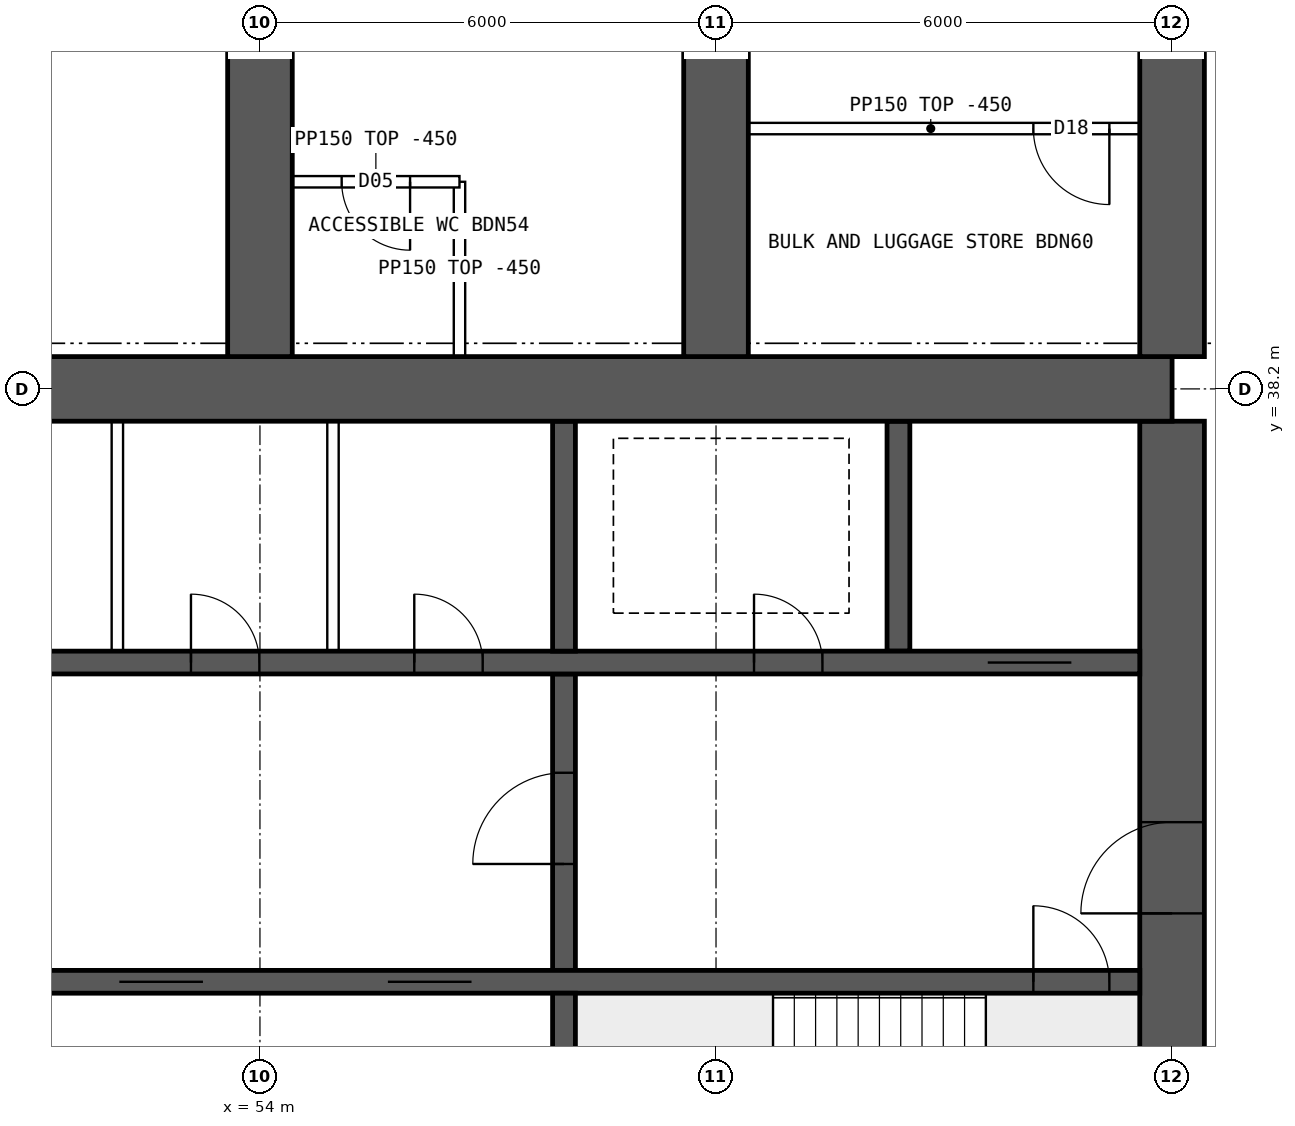
"""IFC4 building model, lengths in metres.
Left out: names, types, materials, properties, quantities, classifications, styles, units other than length and angle.
Written with IfcOpenShell. Run it as: python <this file> out.ifc"""

import sys

from ifc_helpers import new_model, si_unit, direction, frame, frame_2d, origin, place, context, subcontext, project, spatial, rectangle, extrude, element, fill, save


model = new_model("IFC4")
c1 = context("Model", 3, precision=1e-05, world=origin(), true_north=direction((0.0, 1.0)))
c2 = subcontext(c1, "Body", "Model", "MODEL_VIEW")
j1 = project(units=[si_unit("LENGTHUNIT", "METRE"), si_unit("PLANEANGLEUNIT", "RADIAN")], contexts=[c1])
p1 = place(None, origin())
s1 = spatial("IfcSite", under=j1, at=p1, CompositionType="ELEMENT")
p2 = place(p1, origin())
s2 = spatial("IfcBuilding", under=s1, at=p2, CompositionType="ELEMENT")
p3 = place(p2, frame((0.0, 0.0, 189.85)))
s3 = spatial("IfcBuildingStorey", under=s2, at=p3, CompositionType="ELEMENT", Elevation=189.85)
p4 = place(p3, frame((18.0, 38.2, 0.0), z_axis=(0.0, 0.0, 1.0), x_axis=(1.0, 0.0, 0.0)))
e1 = element("IfcWall", 1, at=p4, inside=s3, PredefinedType="SHEAR", context=c2, shape_type="SweptSolid", body=[
    extrude(rectangle(XDim=48.0, YDim=0.85, at=frame_2d((24.0, 0.0))), origin(), (0.0, 0.0, 1.0), 3.75),
])
p5 = place(p3, frame((66.0, 26.225, 0.0), z_axis=(0.0, 0.0, 1.0), x_axis=(0.0, 1.0, 0.0)))
e2 = element("IfcWall", 2, at=p5, inside=s3, PredefinedType="SHEAR", context=c2, shape_type="SweptSolid", body=[
    extrude(rectangle(XDim=11.55, YDim=0.85, at=frame_2d((5.775, 0.0))), origin(), (0.0, 0.0, 1.0), 3.75),
])
p6 = place(p5, frame((5.075, 0.0, 0.0)))
e3 = element("IfcOpeningElement", 3, at=p6, cuts=e2, PredefinedType="OPENING", context=c2, shape_type="SweptSolid", body=[
    extrude(rectangle(XDim=1.2, YDim=2.1, at=frame_2d((0.6, 1.05))), frame((0.0, 0.435, 0.0), z_axis=(0.0, -1.0, 0.0), x_axis=(1.0, 0.0, 0.0)), (0.0, 0.0, 1.0), 0.87),
])
p7 = place(p3, frame((18.425, 30.4, 0.0), z_axis=(0.0, 0.0, 1.0), x_axis=(1.0, 0.0, 0.0)))
e4 = element("IfcWall", 4, at=p7, inside=s3, PredefinedType="SHEAR", context=c2, shape_type="SweptSolid", body=[
    extrude(rectangle(XDim=47.15, YDim=0.3, at=frame_2d((23.575, 0.0))), origin(), (0.0, 0.0, 1.0), 3.75),
])
p8 = place(p7, frame((0.4, 0.0, 0.0)))
e5 = element("IfcOpeningElement", 5, at=p8, cuts=e4, PredefinedType="OPENING", context=c2, shape_type="SweptSolid", body=[
    extrude(rectangle(XDim=1.0, YDim=2.1, at=frame_2d((0.5, 1.05))), frame((0.0, 0.16, 0.0), z_axis=(0.0, -1.0, 0.0), x_axis=(1.0, 0.0, 0.0)), (0.0, 0.0, 1.0), 0.32),
])
p9 = place(p7, frame((45.75, 0.0, 0.0)))
e6 = element("IfcOpeningElement", 6, at=p9, cuts=e4, PredefinedType="OPENING", context=c2, shape_type="SweptSolid", body=[
    extrude(rectangle(XDim=1.0, YDim=2.1, at=frame_2d((0.5, 1.05))), frame((0.0, 0.16, 0.0), z_axis=(0.0, -1.0, 0.0), x_axis=(1.0, 0.0, 0.0)), (0.0, 0.0, 1.0), 0.32),
])
p10 = place(p7, frame((8.325, 0.0, 0.0)))
e7 = element("IfcOpeningElement", 7, at=p10, cuts=e4, PredefinedType="OPENING", context=c2, shape_type="SweptSolid", body=[
    extrude(rectangle(XDim=1.1, YDim=2.1, at=frame_2d((0.55, 1.05))), frame((0.0, 0.16, 0.0), z_axis=(0.0, -1.0, 0.0), x_axis=(1.0, 0.0, 0.0)), (0.0, 0.0, 1.0), 0.32),
])
p11 = place(p7, frame((10.925, 0.0, 0.0)))
e8 = element("IfcOpeningElement", 8, at=p11, cuts=e4, PredefinedType="OPENING", context=c2, shape_type="SweptSolid", body=[
    extrude(rectangle(XDim=1.1, YDim=2.1, at=frame_2d((0.55, 1.05))), frame((0.0, 0.16, 0.0), z_axis=(0.0, -1.0, 0.0), x_axis=(1.0, 0.0, 0.0)), (0.0, 0.0, 1.0), 0.32),
])
p12 = place(p7, frame((13.525, 0.0, 0.0)))
e9 = element("IfcOpeningElement", 9, at=p12, cuts=e4, PredefinedType="OPENING", context=c2, shape_type="SweptSolid", body=[
    extrude(rectangle(XDim=1.1, YDim=2.1, at=frame_2d((0.55, 1.05))), frame((0.0, 0.16, 0.0), z_axis=(0.0, -1.0, 0.0), x_axis=(1.0, 0.0, 0.0)), (0.0, 0.0, 1.0), 0.32),
])
p13 = place(p7, frame((16.125, 0.0, 0.0)))
e10 = element("IfcOpeningElement", 10, at=p13, cuts=e4, PredefinedType="OPENING", context=c2, shape_type="SweptSolid", body=[
    extrude(rectangle(XDim=1.1, YDim=2.1, at=frame_2d((0.55, 1.05))), frame((0.0, 0.16, 0.0), z_axis=(0.0, -1.0, 0.0), x_axis=(1.0, 0.0, 0.0)), (0.0, 0.0, 1.0), 0.32),
])
p14 = place(p7, frame((18.9, 0.0, 0.0)))
e11 = element("IfcOpeningElement", 11, at=p14, cuts=e4, PredefinedType="OPENING", context=c2, shape_type="SweptSolid", body=[
    extrude(rectangle(XDim=0.9, YDim=2.1, at=frame_2d((0.45, 1.05))), frame((0.0, 0.16, 0.0), z_axis=(0.0, -1.0, 0.0), x_axis=(1.0, 0.0, 0.0)), (0.0, 0.0, 1.0), 0.32),
])
p15 = place(p7, frame((30.192, 0.0, 0.0)))
e12 = element("IfcOpeningElement", 12, at=p15, cuts=e4, PredefinedType="OPENING", context=c2, shape_type="SweptSolid", body=[
    extrude(rectangle(XDim=1.1, YDim=2.1, at=frame_2d((0.55, 1.05))), frame((0.0, 0.16, 0.0), z_axis=(0.0, -1.0, 0.0), x_axis=(1.0, 0.0, 0.0)), (0.0, 0.0, 1.0), 0.32),
])
p16 = place(p7, frame((33.725, 0.0, 0.0)))
e13 = element("IfcOpeningElement", 13, at=p16, cuts=e4, PredefinedType="OPENING", context=c2, shape_type="SweptSolid", body=[
    extrude(rectangle(XDim=1.1, YDim=2.1, at=frame_2d((0.55, 1.05))), frame((0.0, 0.16, 0.0), z_axis=(0.0, -1.0, 0.0), x_axis=(1.0, 0.0, 0.0)), (0.0, 0.0, 1.0), 0.32),
])
p17 = place(p7, frame((37.258, 0.0, 0.0)))
e14 = element("IfcOpeningElement", 14, at=p17, cuts=e4, PredefinedType="OPENING", context=c2, shape_type="SweptSolid", body=[
    extrude(rectangle(XDim=1.1, YDim=2.1, at=frame_2d((0.55, 1.05))), frame((0.0, 0.16, 0.0), z_axis=(0.0, -1.0, 0.0), x_axis=(1.0, 0.0, 0.0)), (0.0, 0.0, 1.0), 0.32),
])
p18 = place(p3, frame((18.425, 34.6, 0.0), z_axis=(0.0, 0.0, 1.0), x_axis=(1.0, 0.0, 0.0)))
e15 = element("IfcWall", 15, at=p18, inside=s3, PredefinedType="SHEAR", context=c2, shape_type="SweptSolid", body=[
    extrude(rectangle(XDim=47.15, YDim=0.3, at=frame_2d((23.575, 0.0))), origin(), (0.0, 0.0, 1.0), 3.75),
])
p19 = place(p18, frame((0.9, 0.0, 0.0)))
e16 = element("IfcOpeningElement", 16, at=p19, cuts=e15, PredefinedType="OPENING", context=c2, shape_type="SweptSolid", body=[
    extrude(rectangle(XDim=1.1, YDim=2.1, at=frame_2d((0.55, 1.05))), frame((0.0, 0.16, 0.0), z_axis=(0.0, -1.0, 0.0), x_axis=(1.0, 0.0, 0.0)), (0.0, 0.0, 1.0), 0.32),
])
p20 = place(p18, frame((45.15, 0.0, 0.0)))
e17 = element("IfcOpeningElement", 17, at=p20, cuts=e15, PredefinedType="OPENING", context=c2, shape_type="SweptSolid", body=[
    extrude(rectangle(XDim=1.1, YDim=2.1, at=frame_2d((0.55, 1.05))), frame((0.0, 0.16, 0.0), z_axis=(0.0, -1.0, 0.0), x_axis=(1.0, 0.0, 0.0)), (0.0, 0.0, 1.0), 0.32),
])
p21 = place(p18, frame((4.175, 0.0, 0.0)))
e18 = element("IfcOpeningElement", 18, at=p21, cuts=e15, PredefinedType="OPENING", context=c2, shape_type="SweptSolid", body=[
    extrude(rectangle(XDim=0.9, YDim=2.1, at=frame_2d((0.45, 1.05))), frame((0.0, 0.16, 0.0), z_axis=(0.0, -1.0, 0.0), x_axis=(1.0, 0.0, 0.0)), (0.0, 0.0, 1.0), 0.32),
])
p22 = place(p18, frame((42.075, 0.0, 0.0)))
e19 = element("IfcOpeningElement", 19, at=p22, cuts=e15, PredefinedType="OPENING", context=c2, shape_type="SweptSolid", body=[
    extrude(rectangle(XDim=0.9, YDim=2.1, at=frame_2d((0.45, 1.05))), frame((0.0, 0.16, 0.0), z_axis=(0.0, -1.0, 0.0), x_axis=(1.0, 0.0, 0.0)), (0.0, 0.0, 1.0), 0.32),
])
p23 = place(p18, frame((8.95, 0.0, 0.0)))
e20 = element("IfcOpeningElement", 20, at=p23, cuts=e15, PredefinedType="OPENING", context=c2, shape_type="SweptSolid", body=[
    extrude(rectangle(XDim=0.9, YDim=2.1, at=frame_2d((0.45, 1.05))), frame((0.0, 0.16, 0.0), z_axis=(0.0, -1.0, 0.0), x_axis=(1.0, 0.0, 0.0)), (0.0, 0.0, 1.0), 0.32),
])
p24 = place(p18, frame((12.924, 0.0, 0.0)))
e21 = element("IfcOpeningElement", 21, at=p24, cuts=e15, PredefinedType="OPENING", context=c2, shape_type="SweptSolid", body=[
    extrude(rectangle(XDim=0.9, YDim=2.1, at=frame_2d((0.45, 1.05))), frame((0.0, 0.16, 0.0), z_axis=(0.0, -1.0, 0.0), x_axis=(1.0, 0.0, 0.0)), (0.0, 0.0, 1.0), 0.32),
])
p25 = place(p18, frame((16.571, 0.0, 0.0)))
e22 = element("IfcOpeningElement", 22, at=p25, cuts=e15, PredefinedType="OPENING", context=c2, shape_type="SweptSolid", body=[
    extrude(rectangle(XDim=0.9, YDim=2.1, at=frame_2d((0.45, 1.05))), frame((0.0, 0.16, 0.0), z_axis=(0.0, -1.0, 0.0), x_axis=(1.0, 0.0, 0.0)), (0.0, 0.0, 1.0), 0.32),
])
p26 = place(p18, frame((20.33, 0.0, 0.0)))
e23 = element("IfcOpeningElement", 23, at=p26, cuts=e15, PredefinedType="OPENING", context=c2, shape_type="SweptSolid", body=[
    extrude(rectangle(XDim=0.9, YDim=2.1, at=frame_2d((0.45, 1.05))), frame((0.0, 0.16, 0.0), z_axis=(0.0, -1.0, 0.0), x_axis=(1.0, 0.0, 0.0)), (0.0, 0.0, 1.0), 0.32),
])
p27 = place(p18, frame((24.736, 0.0, 0.0)))
e24 = element("IfcOpeningElement", 24, at=p27, cuts=e15, PredefinedType="OPENING", context=c2, shape_type="SweptSolid", body=[
    extrude(rectangle(XDim=0.9, YDim=2.1, at=frame_2d((0.45, 1.05))), frame((0.0, 0.16, 0.0), z_axis=(0.0, -1.0, 0.0), x_axis=(1.0, 0.0, 0.0)), (0.0, 0.0, 1.0), 0.32),
])
p28 = place(p18, frame((27.533, 0.0, 0.0)))
e25 = element("IfcOpeningElement", 25, at=p28, cuts=e15, PredefinedType="OPENING", context=c2, shape_type="SweptSolid", body=[
    extrude(rectangle(XDim=0.9, YDim=2.1, at=frame_2d((0.45, 1.05))), frame((0.0, 0.16, 0.0), z_axis=(0.0, -1.0, 0.0), x_axis=(1.0, 0.0, 0.0)), (0.0, 0.0, 1.0), 0.32),
])
p29 = place(p18, frame((30.716, 0.0, 0.0)))
e26 = element("IfcOpeningElement", 26, at=p29, cuts=e15, PredefinedType="OPENING", context=c2, shape_type="SweptSolid", body=[
    extrude(rectangle(XDim=0.9, YDim=2.1, at=frame_2d((0.45, 1.05))), frame((0.0, 0.16, 0.0), z_axis=(0.0, -1.0, 0.0), x_axis=(1.0, 0.0, 0.0)), (0.0, 0.0, 1.0), 0.32),
])
p30 = place(p18, frame((34.667, 0.0, 0.0)))
e27 = element("IfcOpeningElement", 27, at=p30, cuts=e15, PredefinedType="OPENING", context=c2, shape_type="SweptSolid", body=[
    extrude(rectangle(XDim=0.9, YDim=2.1, at=frame_2d((0.45, 1.05))), frame((0.0, 0.16, 0.0), z_axis=(0.0, -1.0, 0.0), x_axis=(1.0, 0.0, 0.0)), (0.0, 0.0, 1.0), 0.32),
])
p31 = place(p18, frame((37.605, 0.0, 0.0)))
e28 = element("IfcOpeningElement", 28, at=p31, cuts=e15, PredefinedType="OPENING", context=c2, shape_type="SweptSolid", body=[
    extrude(rectangle(XDim=0.9, YDim=2.1, at=frame_2d((0.45, 1.05))), frame((0.0, 0.16, 0.0), z_axis=(0.0, -1.0, 0.0), x_axis=(1.0, 0.0, 0.0)), (0.0, 0.0, 1.0), 0.32),
])
p32 = place(p3, frame((58.0, 26.225, 0.0), z_axis=(0.0, 0.0, 1.0), x_axis=(0.0, 1.0, 0.0)))
e29 = element("IfcWall", 29, at=p32, inside=s3, PredefinedType="SHEAR", context=c2, shape_type="SweptSolid", body=[
    extrude(rectangle(XDim=4.025, YDim=0.3, at=frame_2d((2.012, 0.0))), origin(), (0.0, 0.0, 1.0), 3.75),
])
p33 = place(p3, frame((58.0, 30.55, 0.0), z_axis=(0.0, 0.0, 1.0), x_axis=(0.0, 1.0, 0.0)))
e30 = element("IfcWall", 30, at=p33, inside=s3, PredefinedType="SHEAR", context=c2, shape_type="SweptSolid", body=[
    extrude(rectangle(XDim=3.9, YDim=0.3, at=frame_2d((1.95, 0.0))), origin(), (0.0, 0.0, 1.0), 3.75),
])
p34 = place(p33, frame((1.4, 0.0, 0.0)))
e31 = element("IfcOpeningElement", 31, at=p34, cuts=e30, PredefinedType="OPENING", context=c2, shape_type="SweptSolid", body=[
    extrude(rectangle(XDim=1.2, YDim=2.1, at=frame_2d((0.6, 1.05))), frame((0.0, 0.16, 0.0), z_axis=(0.0, -1.0, 0.0), x_axis=(1.0, 0.0, 0.0)), (0.0, 0.0, 1.0), 0.32),
])
for number, where, z_axis, x_axis in (
    (32, (62.4, 34.75, 0.0), (0.0, 0.0, 1.0), (0.0, 1.0, 0.0)),
    (33, (58.0, 34.75, 0.0), (0.0, 0.0, 1.0), (0.0, 1.0, 0.0)),
):
    element("IfcWall", number, at=place(p3, frame(where, z_axis=z_axis, x_axis=x_axis)), inside=s3, PredefinedType="SHEAR", context=c2, shape_type="SweptSolid", body=[
        extrude(rectangle(XDim=3.025, YDim=0.3, at=frame_2d((1.512, 0.0))), origin(), (0.0, 0.0, 1.0), 3.75),
    ])
for number, where, z_axis, x_axis in (
    (34, (54.0, 38.625, 0.0), (0.0, 0.0, 1.0), (0.0, 1.0, 0.0)),
    (35, (60.0, 38.625, 0.0), (0.0, 0.0, 1.0), (0.0, 1.0, 0.0)),
    (36, (66.0, 38.625, 0.0), (0.0, 0.0, 1.0), (0.0, 1.0, 0.0)),
):
    element("IfcWall", number, at=place(p3, frame(where, z_axis=z_axis, x_axis=x_axis)), inside=s3, PredefinedType="SHEAR", context=c2, shape_type="SweptSolid", body=[
        extrude(rectangle(XDim=8.175, YDim=0.85, at=frame_2d((4.087, 0.0))), origin(), (0.0, 0.0, 1.0), 3.75),
    ])
for number, where, z_axis, x_axis in (
    (37, (52.124, 34.75, 0.0), (0.0, 0.0, 1.0), (0.0, 1.0, 0.0)),
    (38, (54.961, 34.75, 0.0), (0.0, 0.0, 1.0), (0.0, 1.0, 0.0)),
):
    element("IfcWall", number, at=place(p3, frame(where, z_axis=z_axis, x_axis=x_axis)), inside=s3, PredefinedType="SOLIDWALL", context=c2, shape_type="SweptSolid", body=[
        extrude(rectangle(XDim=3.025, YDim=0.15, at=frame_2d((1.512, 0.0))), origin(), (0.0, 0.0, 1.0), 3.3),
    ])
p35 = place(p3, frame((56.625, 40.925, 0.0), z_axis=(0.0, 0.0, 1.0), x_axis=(0.0, -1.0, 0.0)))
e39 = element("IfcWall", 39, at=p35, inside=s3, PredefinedType="PARTITIONING", context=c2, shape_type="SweptSolid", body=[
    extrude(rectangle(XDim=2.3, YDim=0.15, at=frame_2d((1.15, 0.0))), origin(), (0.0, 0.0, 1.0), 3.3),
])
p36 = place(p3, frame((56.625, 40.925, 0.0), z_axis=(0.0, 0.0, 1.0), x_axis=(-1.0, 0.0, 0.0)))
e40 = element("IfcWall", 40, at=p36, inside=s3, PredefinedType="PARTITIONING", context=c2, shape_type="SweptSolid", body=[
    extrude(rectangle(XDim=2.2, YDim=0.15, at=frame_2d((1.1, 0.0))), origin(), (0.0, 0.0, 1.0), 3.3),
])
p37 = place(p36, frame((0.65, 0.0, 0.0)))
e41 = element("IfcOpeningElement", 41, at=p37, cuts=e40, PredefinedType="OPENING", context=c2, shape_type="SweptSolid", body=[
    extrude(rectangle(XDim=0.9, YDim=2.1, at=frame_2d((0.45, 1.05))), frame((0.0, 0.085, 0.0), z_axis=(0.0, -1.0, 0.0), x_axis=(1.0, 0.0, 0.0)), (0.0, 0.0, 1.0), 0.17),
])
p38 = place(p3, frame((65.575, 41.625, 0.0), z_axis=(0.0, 0.0, 1.0), x_axis=(-1.0, 0.0, 0.0)))
e42 = element("IfcWall", 42, at=p38, inside=s3, PredefinedType="PARTITIONING", context=c2, shape_type="SweptSolid", body=[
    extrude(rectangle(XDim=5.5, YDim=0.15, at=frame_2d((2.75, 0.0))), origin(), (0.0, 0.0, 1.0), 3.3),
])
p39 = place(p38, frame((0.4, 0.0, 0.0)))
e43 = element("IfcOpeningElement", 43, at=p39, cuts=e42, PredefinedType="OPENING", context=c2, shape_type="SweptSolid", body=[
    extrude(rectangle(XDim=1.0, YDim=2.1, at=frame_2d((0.5, 1.05))), frame((0.0, 0.085, 0.0), z_axis=(0.0, -1.0, 0.0), x_axis=(1.0, 0.0, 0.0)), (0.0, 0.0, 1.0), 0.17),
])
p40 = place(p6, origin())
e44 = element("IfcDoor", 44, at=p40, inside=s3, OperationType="SINGLE_SWING_LEFT", PredefinedType="DOOR", context=c2, shape_type="SweptSolid", body=[
    extrude(rectangle(XDim=1.2, YDim=2.1, at=frame_2d((0.6, 1.05))), frame((0.0, 0.025, 0.0), z_axis=(0.0, -1.0, 0.0), x_axis=(1.0, 0.0, 0.0)), (0.0, 0.0, 1.0), 0.05),
])
fill(e3, e44)
p41 = place(p9, origin())
e45 = element("IfcDoor", 45, at=p41, inside=s3, OperationType="SINGLE_SWING_LEFT", PredefinedType="DOOR", context=c2, shape_type="SweptSolid", body=[
    extrude(rectangle(XDim=1.0, YDim=2.1, at=frame_2d((0.5, 1.05))), frame((0.0, 0.025, 0.0), z_axis=(0.0, -1.0, 0.0), x_axis=(1.0, 0.0, 0.0)), (0.0, 0.0, 1.0), 0.05),
])
fill(e6, e45)
p42 = place(p20, origin())
e46 = element("IfcDoor", 46, at=p42, inside=s3, OperationType="DOUBLE_DOOR_SLIDING", PredefinedType="DOOR", context=c2, shape_type="SweptSolid", body=[
    extrude(rectangle(XDim=1.1, YDim=2.1, at=frame_2d((0.55, 1.05))), frame((0.0, 0.025, 0.0), z_axis=(0.0, -1.0, 0.0), x_axis=(1.0, 0.0, 0.0)), (0.0, 0.0, 1.0), 0.05),
])
fill(e17, e46)
p43 = place(p22, origin())
e47 = element("IfcDoor", 47, at=p43, inside=s3, OperationType="SINGLE_SWING_LEFT", PredefinedType="DOOR", context=c2, shape_type="SweptSolid", body=[
    extrude(rectangle(XDim=0.9, YDim=2.1, at=frame_2d((0.45, 1.05))), frame((0.0, 0.025, 0.0), z_axis=(0.0, -1.0, 0.0), x_axis=(1.0, 0.0, 0.0)), (0.0, 0.0, 1.0), 0.05),
])
fill(e19, e47)
p44 = place(p34, origin())
e48 = element("IfcDoor", 48, at=p44, inside=s3, OperationType="SINGLE_SWING_LEFT", PredefinedType="DOOR", context=c2, shape_type="SweptSolid", body=[
    extrude(rectangle(XDim=1.2, YDim=2.1, at=frame_2d((0.6, 1.05))), frame((0.0, 0.025, 0.0), z_axis=(0.0, -1.0, 0.0), x_axis=(1.0, 0.0, 0.0)), (0.0, 0.0, 1.0), 0.05),
])
fill(e31, e48)
p45 = place(p30, origin())
e49 = element("IfcDoor", 49, at=p45, inside=s3, OperationType="SINGLE_SWING_LEFT", PredefinedType="DOOR", context=c2, shape_type="SweptSolid", body=[
    extrude(rectangle(XDim=0.9, YDim=2.1, at=frame_2d((0.45, 1.05))), frame((0.0, 0.025, 0.0), z_axis=(0.0, -1.0, 0.0), x_axis=(1.0, 0.0, 0.0)), (0.0, 0.0, 1.0), 0.05),
])
fill(e27, e49)
p46 = place(p31, origin())
e50 = element("IfcDoor", 50, at=p46, inside=s3, OperationType="SINGLE_SWING_LEFT", PredefinedType="DOOR", context=c2, shape_type="SweptSolid", body=[
    extrude(rectangle(XDim=0.9, YDim=2.1, at=frame_2d((0.45, 1.05))), frame((0.0, 0.025, 0.0), z_axis=(0.0, -1.0, 0.0), x_axis=(1.0, 0.0, 0.0)), (0.0, 0.0, 1.0), 0.05),
])
fill(e28, e50)
p47 = place(p16, origin())
e51 = element("IfcDoor", 51, at=p47, inside=s3, OperationType="DOUBLE_DOOR_SLIDING", PredefinedType="DOOR", context=c2, shape_type="SweptSolid", body=[
    extrude(rectangle(XDim=1.1, YDim=2.1, at=frame_2d((0.55, 1.05))), frame((0.0, 0.025, 0.0), z_axis=(0.0, -1.0, 0.0), x_axis=(1.0, 0.0, 0.0)), (0.0, 0.0, 1.0), 0.05),
])
fill(e13, e51)
p48 = place(p17, origin())
e52 = element("IfcDoor", 52, at=p48, inside=s3, OperationType="DOUBLE_DOOR_SLIDING", PredefinedType="DOOR", context=c2, shape_type="SweptSolid", body=[
    extrude(rectangle(XDim=1.1, YDim=2.1, at=frame_2d((0.55, 1.05))), frame((0.0, 0.025, 0.0), z_axis=(0.0, -1.0, 0.0), x_axis=(1.0, 0.0, 0.0)), (0.0, 0.0, 1.0), 0.05),
])
fill(e14, e52)
p49 = place(p37, origin())
e53 = element("IfcDoor", 53, at=p49, inside=s3, OperationType="SINGLE_SWING_LEFT", PredefinedType="DOOR", context=c2, shape_type="SweptSolid", body=[
    extrude(rectangle(XDim=0.9, YDim=2.1, at=frame_2d((0.45, 1.05))), frame((0.0, 0.025, 0.0), z_axis=(0.0, -1.0, 0.0), x_axis=(1.0, 0.0, 0.0)), (0.0, 0.0, 1.0), 0.05),
])
fill(e41, e53)
p50 = place(p39, origin())
e54 = element("IfcDoor", 54, at=p50, inside=s3, OperationType="SINGLE_SWING_LEFT", PredefinedType="DOOR", context=c2, shape_type="SweptSolid", body=[
    extrude(rectangle(XDim=1.0, YDim=2.1, at=frame_2d((0.5, 1.05))), frame((0.0, 0.025, 0.0), z_axis=(0.0, -1.0, 0.0), x_axis=(1.0, 0.0, 0.0)), (0.0, 0.0, 1.0), 0.05),
])
fill(e43, e54)
save(model, sys.argv[1])
